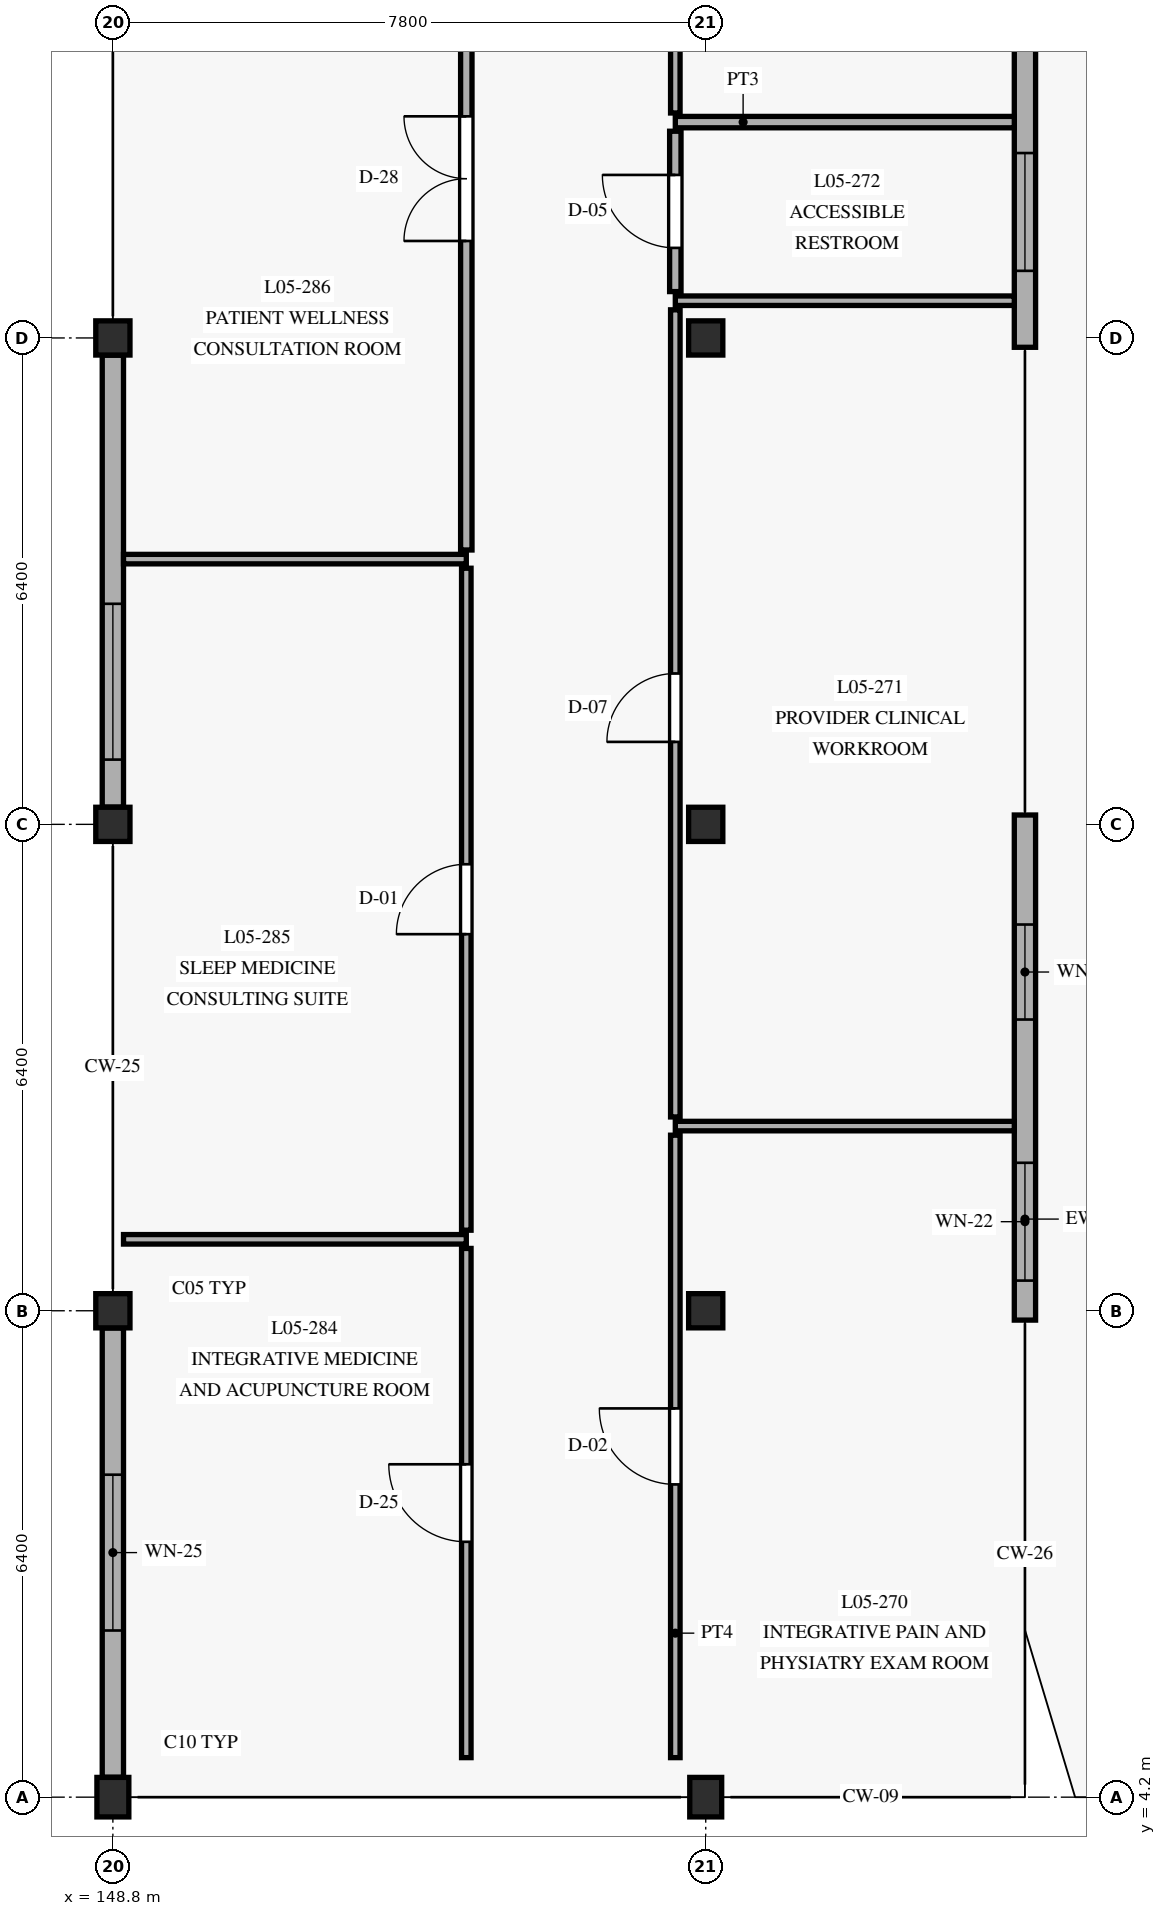
"""IFC4 building model, lengths in metres.
Left out: names, types, materials, properties, quantities, classifications, styles, units other than length and angle.
Written with IfcOpenShell. Run it as: python <this file> out.ifc"""

import sys

from ifc_helpers import new_model, si_unit, direction, frame, frame_2d, origin, origin_with_axes, origin_2d, place, context, subcontext, project, spatial, rectangle, extrude, element, fill, save


model = new_model("IFC4")
c1 = context("Model", 3, precision=1e-05, world=origin(), true_north=direction((0.0, 1.0)))
c2 = subcontext(c1, "Body", "Model", "MODEL_VIEW")
j1 = project(units=[si_unit("LENGTHUNIT", "METRE"), si_unit("PLANEANGLEUNIT", "RADIAN")], contexts=[c1])
p1 = place(None, origin())
s1 = spatial("IfcSite", under=j1, at=p1, CompositionType="ELEMENT")
p2 = place(p1, origin())
s2 = spatial("IfcBuilding", under=s1, at=p2, CompositionType="ELEMENT")
p3 = place(p2, frame((0.0, 0.0, 17.55)))
s3 = spatial("IfcBuildingStorey", under=s2, at=p3, CompositionType="ELEMENT", Elevation=17.55)
p4 = place(p3, frame((148.8, 4.2, 0.0), z_axis=(0.0, 0.0, 1.0), x_axis=(1.0, 0.0, 0.0)))
e1 = element("IfcColumn", 1, at=p4, inside=s3, PredefinedType="COLUMN", context=c2, shape_type="SweptSolid", body=[
    extrude(rectangle(XDim=0.42, YDim=0.52, at=origin_2d()), origin(), (0.0, 0.0, 1.0), 4.05),
])
for number, where, z_axis, x_axis in (
    (2, (148.8, 10.6, 0.0), (0.0, 0.0, 1.0), (1.0, 0.0, 0.0)),
    (3, (148.8, 17.0, 0.0), (0.0, 0.0, 1.0), (1.0, 0.0, 0.0)),
    (4, (148.8, 23.4, 0.0), (0.0, 0.0, 1.0), (1.0, 0.0, 0.0)),
):
    element("IfcColumn", number, at=place(p3, frame(where, z_axis=z_axis, x_axis=x_axis)), inside=s3, PredefinedType="COLUMN", context=c2, shape_type="SweptSolid", body=[
        extrude(rectangle(XDim=0.45, YDim=0.45, at=origin_2d()), origin(), (0.0, 0.0, 1.0), 4.05),
    ])
p5 = place(p3, frame((156.6, 4.2, 0.0), z_axis=(0.0, 0.0, 1.0), x_axis=(1.0, 0.0, 0.0)))
e5 = element("IfcColumn", 5, at=p5, inside=s3, PredefinedType="COLUMN", context=c2, shape_type="SweptSolid", body=[
    extrude(rectangle(XDim=0.42, YDim=0.52, at=origin_2d()), origin(), (0.0, 0.0, 1.0), 4.05),
])
for number, where, z_axis, x_axis in (
    (6, (156.6, 10.6, 0.0), (0.0, 0.0, 1.0), (1.0, 0.0, 0.0)),
    (7, (156.6, 17.0, 0.0), (0.0, 0.0, 1.0), (1.0, 0.0, 0.0)),
    (8, (156.6, 23.4, 0.0), (0.0, 0.0, 1.0), (1.0, 0.0, 0.0)),
):
    element("IfcColumn", number, at=place(p3, frame(where, z_axis=z_axis, x_axis=x_axis)), inside=s3, PredefinedType="COLUMN", context=c2, shape_type="SweptSolid", body=[
        extrude(rectangle(XDim=0.45, YDim=0.45, at=origin_2d()), origin(), (0.0, 0.0, 1.0), 4.05),
    ])
p6 = place(p3, frame((160.8, 10.477, 0.0), z_axis=(0.0, 0.0, 1.0), x_axis=(0.0, 1.0, 0.0)))
e9 = element("IfcWall", 9, at=p6, inside=s3, PredefinedType="SOLIDWALL", context=c2, shape_type="SweptSolid", body=[
    extrude(rectangle(XDim=6.646, YDim=0.28, at=frame_2d((3.323, 0.0))), origin(), (0.0, 0.0, 1.0), 3.84),
])
p7 = place(p6, frame((0.52, 0.0, 0.85)))
e10 = element("IfcOpeningElement", 10, at=p7, cuts=e9, PredefinedType="OPENING", context=c2, shape_type="SweptSolid", body=[
    extrude(rectangle(XDim=1.55, YDim=1.75, at=frame_2d((0.775, 0.875))), frame((0.0, 0.15, 0.0), z_axis=(0.0, -1.0, 0.0), x_axis=(1.0, 0.0, 0.0)), (0.0, 0.0, 1.0), 0.3),
])
p8 = place(p6, frame((3.955, 0.0, 0.85)))
e11 = element("IfcOpeningElement", 11, at=p8, cuts=e9, PredefinedType="OPENING", context=c2, shape_type="SweptSolid", body=[
    extrude(rectangle(XDim=1.25, YDim=1.75, at=frame_2d((0.625, 0.875))), frame((0.0, 0.15, 0.0), z_axis=(0.0, -1.0, 0.0), x_axis=(1.0, 0.0, 0.0)), (0.0, 0.0, 1.0), 0.3),
])
p9 = place(p3, frame((160.8, 23.277, 0.0), z_axis=(0.0, 0.0, 1.0), x_axis=(0.0, 1.0, 0.0)))
e12 = element("IfcWall", 12, at=p9, inside=s3, PredefinedType="SOLIDWALL", context=c2, shape_type="SweptSolid", body=[
    extrude(rectangle(XDim=6.646, YDim=0.28, at=frame_2d((3.323, 0.0))), origin(), (0.0, 0.0, 1.0), 3.84),
])
p10 = place(p9, frame((1.006, 0.0, 0.85)))
e13 = element("IfcOpeningElement", 13, at=p10, cuts=e12, PredefinedType="OPENING", context=c2, shape_type="SweptSolid", body=[
    extrude(rectangle(XDim=1.55, YDim=1.75, at=frame_2d((0.775, 0.875))), frame((0.0, 0.15, 0.0), z_axis=(0.0, -1.0, 0.0), x_axis=(1.0, 0.0, 0.0)), (0.0, 0.0, 1.0), 0.3),
])
p11 = place(p9, frame((4.167, 0.0, 0.85)))
e14 = element("IfcOpeningElement", 14, at=p11, cuts=e12, PredefinedType="OPENING", context=c2, shape_type="SweptSolid", body=[
    extrude(rectangle(XDim=1.25, YDim=1.75, at=frame_2d((0.625, 0.875))), frame((0.0, 0.15, 0.0), z_axis=(0.0, -1.0, 0.0), x_axis=(1.0, 0.0, 0.0)), (0.0, 0.0, 1.0), 0.3),
])
p12 = place(p3, frame((148.8, 10.373, 0.0), z_axis=(0.0, 0.0, 1.0), x_axis=(0.0, -1.0, 0.0)))
e15 = element("IfcWall", 15, at=p12, inside=s3, PredefinedType="SOLIDWALL", context=c2, shape_type="SweptSolid", body=[
    extrude(rectangle(XDim=5.911, YDim=0.28, at=frame_2d((2.956, 0.0))), origin(), (0.0, 0.0, 1.0), 3.46),
])
p13 = place(p12, frame((1.93, 0.0, 0.8)))
e16 = element("IfcOpeningElement", 16, at=p13, cuts=e15, PredefinedType="OPENING", context=c2, shape_type="SweptSolid", body=[
    extrude(rectangle(XDim=2.05, YDim=1.95, at=frame_2d((1.025, 0.975))), frame((0.0, 0.15, 0.0), z_axis=(0.0, -1.0, 0.0), x_axis=(1.0, 0.0, 0.0)), (0.0, 0.0, 1.0), 0.3),
])
p14 = place(p3, frame((148.8, 23.173, 0.0), z_axis=(0.0, 0.0, 1.0), x_axis=(0.0, -1.0, 0.0)))
e17 = element("IfcWall", 17, at=p14, inside=s3, PredefinedType="SOLIDWALL", context=c2, shape_type="SweptSolid", body=[
    extrude(rectangle(XDim=5.946, YDim=0.28, at=frame_2d((2.973, 0.0))), origin(), (0.0, 0.0, 1.0), 3.46),
])
p15 = place(p14, frame((3.271, 0.0, 0.8)))
e18 = element("IfcOpeningElement", 18, at=p15, cuts=e17, PredefinedType="OPENING", context=c2, shape_type="SweptSolid", body=[
    extrude(rectangle(XDim=2.05, YDim=1.95, at=frame_2d((1.025, 0.975))), frame((0.0, 0.15, 0.0), z_axis=(0.0, -1.0, 0.0), x_axis=(1.0, 0.0, 0.0)), (0.0, 0.0, 1.0), 0.3),
])
p16 = place(p3, frame((156.2, 4.72, 0.0), z_axis=(0.0, 0.0, 1.0), x_axis=(0.0, 1.0, 0.0)))
e19 = element("IfcWall", 19, at=p16, inside=s3, PredefinedType="PARTITIONING", context=c2, shape_type="SweptSolid", body=[
    extrude(rectangle(XDim=8.19, YDim=0.125, at=frame_2d((4.095, 0.0))), origin(), (0.0, 0.0, 1.0), 3.435),
])
p17 = place(p16, frame((3.595, 0.0, 0.0)))
e20 = element("IfcOpeningElement", 20, at=p17, cuts=e19, PredefinedType="OPENING", context=c2, shape_type="SweptSolid", body=[
    extrude(rectangle(XDim=1.0, YDim=2.15, at=frame_2d((0.5, 1.075))), frame((0.0, 0.073, 0.0), z_axis=(0.0, -1.0, 0.0), x_axis=(1.0, 0.0, 0.0)), (0.0, 0.0, 1.0), 0.145),
])
p18 = place(p3, frame((156.2, 13.03, 0.0), z_axis=(0.0, 0.0, 1.0), x_axis=(1.0, 0.0, 0.0)))
e21 = element("IfcWall", 21, at=p18, inside=s3, PredefinedType="PARTITIONING", context=c2, shape_type="SweptSolid", body=[
    extrude(rectangle(XDim=4.46, YDim=0.125, at=frame_2d((2.23, 0.0))), origin(), (0.0, 0.0, 1.0), 3.455),
])
p19 = place(p3, frame((156.2, 13.15, 0.0), z_axis=(0.0, 0.0, 1.0), x_axis=(0.0, 1.0, 0.0)))
e22 = element("IfcWall", 22, at=p19, inside=s3, PredefinedType="PARTITIONING", context=c2, shape_type="SweptSolid", body=[
    extrude(rectangle(XDim=10.62, YDim=0.125, at=frame_2d((5.31, 0.0))), origin(), (0.0, 0.0, 1.0), 3.435),
])
p20 = place(p19, frame((4.935, 0.0, 0.0)))
e23 = element("IfcOpeningElement", 23, at=p20, cuts=e22, PredefinedType="OPENING", context=c2, shape_type="SweptSolid", body=[
    extrude(rectangle(XDim=0.9, YDim=2.12, at=frame_2d((0.45, 1.06))), frame((0.0, 0.073, 0.0), z_axis=(0.0, -1.0, 0.0), x_axis=(1.0, 0.0, 0.0)), (0.0, 0.0, 1.0), 0.145),
])
p21 = place(p3, frame((156.2, 23.89, 0.0), z_axis=(0.0, 0.0, 1.0), x_axis=(1.0, 0.0, 0.0)))
e24 = element("IfcWall", 24, at=p21, inside=s3, PredefinedType="PARTITIONING", context=c2, shape_type="SweptSolid", body=[
    extrude(rectangle(XDim=4.46, YDim=0.125, at=frame_2d((2.23, 0.0))), origin(), (0.0, 0.0, 1.0), 3.455),
])
p22 = place(p3, frame((156.2, 24.01, 0.0), z_axis=(0.0, 0.0, 1.0), x_axis=(0.0, 1.0, 0.0)))
e25 = element("IfcWall", 25, at=p22, inside=s3, PredefinedType="PARTITIONING", context=c2, shape_type="SweptSolid", body=[
    extrude(rectangle(XDim=2.11, YDim=0.15, at=frame_2d((1.055, 0.0))), origin(), (0.0, 0.0, 1.0), 3.835),
])
p23 = place(p22, frame((0.575, 0.0, 0.0)))
e26 = element("IfcOpeningElement", 26, at=p23, cuts=e25, PredefinedType="OPENING", context=c2, shape_type="SweptSolid", body=[
    extrude(rectangle(XDim=0.96, YDim=2.1, at=frame_2d((0.48, 1.05))), frame((0.0, 0.085, 0.0), z_axis=(0.0, -1.0, 0.0), x_axis=(1.0, 0.0, 0.0)), (0.0, 0.0, 1.0), 0.17),
])
p24 = place(p3, frame((156.2, 26.24, 0.0), z_axis=(0.0, 0.0, 1.0), x_axis=(1.0, 0.0, 0.0)))
e27 = element("IfcWall", 27, at=p24, inside=s3, PredefinedType="PARTITIONING", context=c2, shape_type="SweptSolid", body=[
    extrude(rectangle(XDim=4.46, YDim=0.15, at=frame_2d((2.23, 0.0))), origin(), (0.0, 0.0, 1.0), 3.455),
])
p25 = place(p3, frame((156.2, 26.36, 0.0), z_axis=(0.0, 0.0, 1.0), x_axis=(0.0, 1.0, 0.0)))
e28 = element("IfcWall", 28, at=p25, inside=s3, PredefinedType="PARTITIONING", context=c2, shape_type="SweptSolid", body=[
    extrude(rectangle(XDim=9.3, YDim=0.125, at=frame_2d((4.65, 0.0))), origin(), (0.0, 0.0, 1.0), 3.435),
])
p26 = place(p25, frame((4.226, 0.0, 0.0)))
e29 = element("IfcOpeningElement", 29, at=p26, cuts=e28, PredefinedType="OPENING", context=c2, shape_type="SweptSolid", body=[
    extrude(rectangle(XDim=1.0, YDim=2.15, at=frame_2d((0.5, 1.075))), frame((0.0, 0.073, 0.0), z_axis=(0.0, -1.0, 0.0), x_axis=(1.0, 0.0, 0.0)), (0.0, 0.0, 1.0), 0.145),
])
p27 = place(p3, frame((153.45, 4.72, 0.0), z_axis=(0.0, 0.0, 1.0), x_axis=(0.0, 1.0, 0.0)))
e30 = element("IfcWall", 30, at=p27, inside=s3, PredefinedType="PARTITIONING", context=c2, shape_type="SweptSolid", body=[
    extrude(rectangle(XDim=6.7, YDim=0.125, at=frame_2d((3.35, 0.0))), origin(), (0.0, 0.0, 1.0), 3.435),
])
p28 = place(p27, frame((2.84, 0.0, 0.0)))
e31 = element("IfcOpeningElement", 31, at=p28, cuts=e30, PredefinedType="OPENING", context=c2, shape_type="SweptSolid", body=[
    extrude(rectangle(XDim=1.02, YDim=2.18, at=frame_2d((0.51, 1.09))), frame((0.0, 0.073, 0.0), z_axis=(0.0, -1.0, 0.0), x_axis=(1.0, 0.0, 0.0)), (0.0, 0.0, 1.0), 0.145),
])
p29 = place(p3, frame((148.94, 11.54, 0.0), z_axis=(0.0, 0.0, 1.0), x_axis=(1.0, 0.0, 0.0)))
e32 = element("IfcWall", 32, at=p29, inside=s3, PredefinedType="PARTITIONING", context=c2, shape_type="SweptSolid", body=[
    extrude(rectangle(XDim=4.51, YDim=0.125, at=frame_2d((2.255, 0.0))), origin(), (0.0, 0.0, 1.0), 3.455),
])
p30 = place(p3, frame((153.45, 11.66, 0.0), z_axis=(0.0, 0.0, 1.0), x_axis=(0.0, 1.0, 0.0)))
e33 = element("IfcWall", 33, at=p30, inside=s3, PredefinedType="PARTITIONING", context=c2, shape_type="SweptSolid", body=[
    extrude(rectangle(XDim=8.71, YDim=0.125, at=frame_2d((4.355, 0.0))), origin(), (0.0, 0.0, 1.0), 3.435),
])
p31 = place(p30, frame((3.895, 0.0, 0.0)))
e34 = element("IfcOpeningElement", 34, at=p31, cuts=e33, PredefinedType="OPENING", context=c2, shape_type="SweptSolid", body=[
    extrude(rectangle(XDim=0.92, YDim=2.15, at=frame_2d((0.46, 1.075))), frame((0.0, 0.073, 0.0), z_axis=(0.0, -1.0, 0.0), x_axis=(1.0, 0.0, 0.0)), (0.0, 0.0, 1.0), 0.145),
])
p32 = place(p3, frame((148.94, 20.49, 0.0), z_axis=(0.0, 0.0, 1.0), x_axis=(1.0, 0.0, 0.0)))
e35 = element("IfcWall", 35, at=p32, inside=s3, PredefinedType="PARTITIONING", context=c2, shape_type="SweptSolid", body=[
    extrude(rectangle(XDim=4.51, YDim=0.125, at=frame_2d((2.255, 0.0))), origin(), (0.0, 0.0, 1.0), 3.455),
])
p33 = place(p3, frame((153.45, 20.61, 0.0), z_axis=(0.0, 0.0, 1.0), x_axis=(0.0, 1.0, 0.0)))
e36 = element("IfcWall", 36, at=p33, inside=s3, PredefinedType="PARTITIONING", context=c2, shape_type="SweptSolid", body=[
    extrude(rectangle(XDim=9.62, YDim=0.15, at=frame_2d((4.81, 0.0))), origin(), (0.0, 0.0, 1.0), 3.435),
])
p34 = place(p33, frame((4.066, 0.0, 0.0)))
e37 = element("IfcOpeningElement", 37, at=p34, cuts=e36, PredefinedType="OPENING", context=c2, shape_type="SweptSolid", body=[
    extrude(rectangle(XDim=1.64, YDim=2.32, at=frame_2d((0.82, 1.16))), frame((0.0, 0.085, 0.0), z_axis=(0.0, -1.0, 0.0), x_axis=(1.0, 0.0, 0.0)), (0.0, 0.0, 1.0), 0.17),
])
p35 = place(p7, origin_with_axes())
e38 = element("IfcWindow", 38, at=p35, inside=s3, PartitioningType="SINGLE_PANEL", PredefinedType="WINDOW", context=c2, shape_type="SweptSolid", body=[
    extrude(rectangle(XDim=1.55, YDim=1.75, at=frame_2d((0.775, 0.875))), frame((0.0, 0.03, 0.0), z_axis=(0.0, -1.0, 0.0), x_axis=(1.0, 0.0, 0.0)), (0.0, 0.0, 1.0), 0.06),
])
fill(e10, e38)
p36 = place(p8, origin_with_axes())
e39 = element("IfcWindow", 39, at=p36, inside=s3, PartitioningType="SINGLE_PANEL", PredefinedType="WINDOW", context=c2, shape_type="SweptSolid", body=[
    extrude(rectangle(XDim=1.25, YDim=1.75, at=frame_2d((0.625, 0.875))), frame((0.0, 0.03, 0.0), z_axis=(0.0, -1.0, 0.0), x_axis=(1.0, 0.0, 0.0)), (0.0, 0.0, 1.0), 0.06),
])
fill(e11, e39)
p37 = place(p10, origin_with_axes())
e40 = element("IfcWindow", 40, at=p37, inside=s3, PartitioningType="SINGLE_PANEL", PredefinedType="WINDOW", context=c2, shape_type="SweptSolid", body=[
    extrude(rectangle(XDim=1.55, YDim=1.75, at=frame_2d((0.775, 0.875))), frame((0.0, 0.03, 0.0), z_axis=(0.0, -1.0, 0.0), x_axis=(1.0, 0.0, 0.0)), (0.0, 0.0, 1.0), 0.06),
])
fill(e13, e40)
p38 = place(p13, origin_with_axes())
e41 = element("IfcWindow", 41, at=p38, inside=s3, PartitioningType="SINGLE_PANEL", PredefinedType="WINDOW", context=c2, shape_type="SweptSolid", body=[
    extrude(rectangle(XDim=2.05, YDim=1.95, at=frame_2d((1.025, 0.975))), frame((0.0, 0.03, 0.0), z_axis=(0.0, -1.0, 0.0), x_axis=(1.0, 0.0, 0.0)), (0.0, 0.0, 1.0), 0.06),
])
fill(e16, e41)
p39 = place(p15, origin_with_axes())
e42 = element("IfcWindow", 42, at=p39, inside=s3, PartitioningType="SINGLE_PANEL", PredefinedType="WINDOW", context=c2, shape_type="SweptSolid", body=[
    extrude(rectangle(XDim=2.05, YDim=1.95, at=frame_2d((1.025, 0.975))), frame((0.0, 0.03, 0.0), z_axis=(0.0, -1.0, 0.0), x_axis=(1.0, 0.0, 0.0)), (0.0, 0.0, 1.0), 0.06),
])
fill(e18, e42)
p40 = place(p17, frame((1.0, 0.0, 0.0), z_axis=(0.0, 0.0, 1.0), x_axis=(-1.0, 0.0, 0.0)))
e43 = element("IfcDoor", 43, at=p40, inside=s3, OperationType="SINGLE_SWING_LEFT", PredefinedType="DOOR", context=c2, shape_type="SweptSolid", body=[
    extrude(rectangle(XDim=1.0, YDim=2.15, at=frame_2d((0.5, 1.075))), frame((0.0, 0.025, 0.0), z_axis=(0.0, -1.0, 0.0), x_axis=(1.0, 0.0, 0.0)), (0.0, 0.0, 1.0), 0.05),
])
fill(e20, e43)
p41 = place(p20, frame((0.9, 0.0, 0.0), z_axis=(0.0, 0.0, 1.0), x_axis=(-1.0, 0.0, 0.0)))
e44 = element("IfcDoor", 44, at=p41, inside=s3, OperationType="SINGLE_SWING_RIGHT", PredefinedType="DOOR", context=c2, shape_type="SweptSolid", body=[
    extrude(rectangle(XDim=0.9, YDim=2.12, at=frame_2d((0.45, 1.06))), frame((0.0, 0.025, 0.0), z_axis=(0.0, -1.0, 0.0), x_axis=(1.0, 0.0, 0.0)), (0.0, 0.0, 1.0), 0.05),
])
fill(e23, e44)
p42 = place(p23, frame((0.96, 0.0, 0.0), z_axis=(0.0, 0.0, 1.0), x_axis=(-1.0, 0.0, 0.0)))
e45 = element("IfcDoor", 45, at=p42, inside=s3, OperationType="SINGLE_SWING_LEFT", PredefinedType="DOOR", context=c2, shape_type="SweptSolid", body=[
    extrude(rectangle(XDim=0.96, YDim=2.1, at=frame_2d((0.48, 1.05))), frame((0.0, 0.025, 0.0), z_axis=(0.0, -1.0, 0.0), x_axis=(1.0, 0.0, 0.0)), (0.0, 0.0, 1.0), 0.05),
])
fill(e26, e45)
p43 = place(p28, origin_with_axes())
e46 = element("IfcDoor", 46, at=p43, inside=s3, OperationType="SINGLE_SWING_RIGHT", PredefinedType="DOOR", context=c2, shape_type="SweptSolid", body=[
    extrude(rectangle(XDim=1.02, YDim=2.18, at=frame_2d((0.51, 1.09))), frame((0.0, 0.025, 0.0), z_axis=(0.0, -1.0, 0.0), x_axis=(1.0, 0.0, 0.0)), (0.0, 0.0, 1.0), 0.05),
])
fill(e31, e46)
p44 = place(p31, origin_with_axes())
e47 = element("IfcDoor", 47, at=p44, inside=s3, OperationType="SINGLE_SWING_LEFT", PredefinedType="DOOR", context=c2, shape_type="SweptSolid", body=[
    extrude(rectangle(XDim=0.92, YDim=2.15, at=frame_2d((0.46, 1.075))), frame((0.0, 0.025, 0.0), z_axis=(0.0, -1.0, 0.0), x_axis=(1.0, 0.0, 0.0)), (0.0, 0.0, 1.0), 0.05),
])
fill(e34, e47)
p45 = place(p34, origin_with_axes())
e48 = element("IfcDoor", 48, at=p45, inside=s3, OperationType="DOUBLE_DOOR_SINGLE_SWING", PredefinedType="DOOR", context=c2, shape_type="SweptSolid", body=[
    extrude(rectangle(XDim=1.64, YDim=2.32, at=frame_2d((0.82, 1.16))), frame((0.0, 0.025, 0.0), z_axis=(0.0, -1.0, 0.0), x_axis=(1.0, 0.0, 0.0)), (0.0, 0.0, 1.0), 0.05),
])
fill(e37, e48)
save(model, sys.argv[1])
